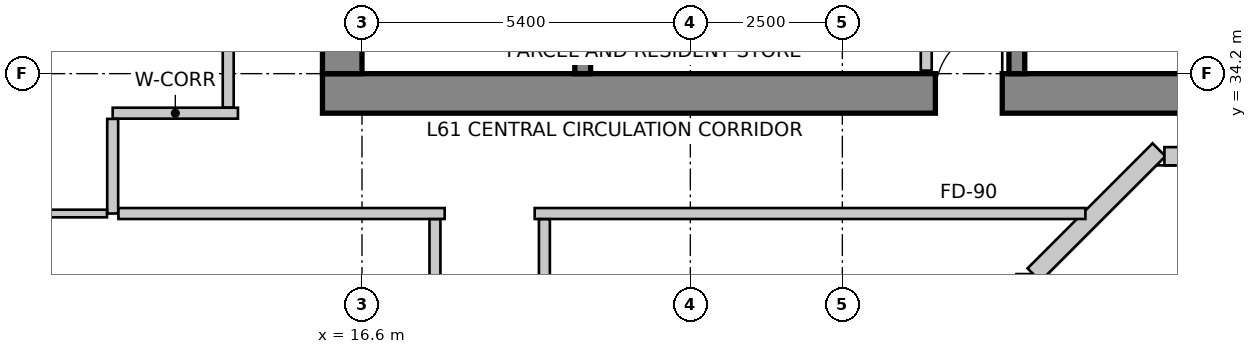
"""IFC4 building model, lengths in metres.
Left out: names, types, materials, properties, quantities, classifications, styles, units other than length and angle.
Written with IfcOpenShell. Run it as: python <this file> out.ifc"""

import sys

from ifc_helpers import new_model, si_unit, direction, frame, frame_2d, origin, place, context, subcontext, project, spatial, rectangle, extrude, source, transform, mapped, element, fill, save


model = new_model("IFC4")
c1 = context("Model", 3, precision=1e-05, world=origin(), true_north=direction((0.0, 1.0)))
c2 = subcontext(c1, "Body", "Model", "MODEL_VIEW")
j1 = project(units=[si_unit("LENGTHUNIT", "METRE"), si_unit("PLANEANGLEUNIT", "RADIAN")], contexts=[c1])
p1 = place(None, origin())
s1 = spatial("IfcSite", under=j1, at=p1, CompositionType="ELEMENT")
p2 = place(p1, origin())
s2 = spatial("IfcBuilding", under=s1, at=p2, CompositionType="ELEMENT")
p3 = place(p2, frame((0.0, 0.0, 239.4)))
s3 = spatial("IfcBuildingStorey", under=s2, at=p3, CompositionType="ELEMENT", Elevation=239.4)
p4 = place(p3, frame((15.95, 33.875, 0.0), z_axis=(0.0, 0.0, 1.0), x_axis=(1.0, 0.0, 0.0)))
e1 = element("IfcWall", 1, at=p4, inside=s3, PredefinedType="SHEAR", context=c2, shape_type="SweptSolid", body=[
    extrude(rectangle(XDim=15.7, YDim=0.65, at=frame_2d((7.85, 0.0))), origin(), (0.0, 0.0, 1.0), 3.5),
])
m1 = source(origin(), c2, "Body", "SweptSolid", [
    extrude(rectangle(XDim=1.1, YDim=2.15, at=frame_2d((0.55, 1.075))), frame((0.0, 0.335, 0.0), z_axis=(0.0, -1.0, 0.0), x_axis=(1.0, 0.0, 0.0)), (0.0, 0.0, 1.0), 0.67),
])
p5 = place(p4, frame((10.08, 0.0, 0.0)))
e2 = element("IfcOpeningElement", 2, at=p5, cuts=e1, PredefinedType="OPENING", context=c2, shape_type="MappedRepresentation", body=[
    mapped(m1, transform((0.0, 0.0, 0.0), scale=1.0)),
])
p6 = place(p3, frame((16.275, 34.2, 0.0), z_axis=(0.0, 0.0, 1.0), x_axis=(0.0, 1.0, 0.0)))
e3 = element("IfcWall", 3, at=p6, inside=s3, PredefinedType="SHEAR", context=c2, shape_type="SweptSolid", body=[
    extrude(rectangle(XDim=11.4, YDim=0.65, at=frame_2d((5.7, 0.0))), origin(), (0.0, 0.0, 1.0), 3.5),
])
p7 = place(p6, frame((7.15, 0.0, 0.0)))
e4 = element("IfcOpeningElement", 4, at=p7, cuts=e3, PredefinedType="OPENING", context=c2, shape_type="MappedRepresentation", body=[
    mapped(m1, transform((0.0, 0.0, 0.0), scale=1.0)),
])
p8 = place(p3, frame((20.23, 34.2, 0.0), z_axis=(0.0, 0.0, 1.0), x_axis=(0.0, 1.0, 0.0)))
e5 = element("IfcWall", 5, at=p8, inside=s3, PredefinedType="SHEAR", context=c2, shape_type="SweptSolid", body=[
    extrude(rectangle(XDim=9.06, YDim=0.26, at=frame_2d((4.53, 0.0))), origin(), (0.0, 0.0, 1.0), 3.5),
])
m2 = source(origin(), c2, "Body", "SweptSolid", [
    extrude(rectangle(XDim=1.1, YDim=2.15, at=frame_2d((0.55, 1.075))), frame((0.0, 0.14, 0.0), z_axis=(0.0, -1.0, 0.0), x_axis=(1.0, 0.0, 0.0)), (0.0, 0.0, 1.0), 0.28),
])
p9 = place(p8, frame((7.45, 0.0, 0.0)))
e6 = element("IfcOpeningElement", 6, at=p9, cuts=e5, PredefinedType="OPENING", context=c2, shape_type="MappedRepresentation", body=[
    mapped(m2, transform((0.0, 0.0, 0.0), scale=1.0)),
])
p10 = place(p3, frame((27.37, 34.2, 0.0), z_axis=(0.0, 0.0, 1.0), x_axis=(0.0, 1.0, 0.0)))
e7 = element("IfcWall", 7, at=p10, inside=s3, PredefinedType="SHEAR", context=c2, shape_type="SweptSolid", body=[
    extrude(rectangle(XDim=9.06, YDim=0.26, at=frame_2d((4.53, 0.0))), origin(), (0.0, 0.0, 1.0), 3.5),
])
p11 = place(p10, frame((7.45, 0.0, 0.0)))
e8 = element("IfcOpeningElement", 8, at=p11, cuts=e7, PredefinedType="OPENING", context=c2, shape_type="MappedRepresentation", body=[
    mapped(m2, transform((0.0, 0.0, 0.0), scale=1.0)),
])
p12 = place(p3, frame((27.514, 16.457, 0.0), z_axis=(0.0, 0.0, 1.0), x_axis=(0.0, 1.0, 0.0)))
e9 = element("IfcWall", 9, at=p12, inside=s3, PredefinedType="SOLIDWALL", context=c2, shape_type="SweptSolid", body=[
    extrude(rectangle(XDim=14.447, YDim=0.3, at=frame_2d((7.223, 0.0))), origin(), (0.0, 0.0, 1.0), 3.2),
])
m3 = source(origin(), c2, "Body", "SweptSolid", [
    extrude(rectangle(XDim=1.6, YDim=2.15, at=frame_2d((0.8, 1.075))), frame((0.0, 0.16, 0.0), z_axis=(0.0, -1.0, 0.0), x_axis=(1.0, 0.0, 0.0)), (0.0, 0.0, 1.0), 0.32),
])
p13 = place(p12, frame((8.993, 0.0, 0.0)))
e10 = element("IfcOpeningElement", 10, at=p13, cuts=e9, PredefinedType="OPENING", context=c2, shape_type="MappedRepresentation", body=[
    mapped(m3, transform((0.0, 0.0, 0.0), scale=1.0)),
])
m4 = source(origin(), c2, "Body", "SweptSolid", [
    extrude(rectangle(XDim=2.1, YDim=2.0, at=frame_2d((1.05, 1.0))), frame((0.0, 0.16, 0.0), z_axis=(0.0, -1.0, 0.0), x_axis=(1.0, 0.0, 0.0)), (0.0, 0.0, 1.0), 0.32),
])
p14 = place(p12, frame((0.521, 0.0, 0.85)))
e11 = element("IfcOpeningElement", 11, at=p14, cuts=e9, PredefinedType="OPENING", context=c2, shape_type="MappedRepresentation", body=[
    mapped(m4, transform((0.0, 0.0, 0.0), scale=1.0)),
])
p15 = place(p12, frame((4.243, 0.0, 0.85)))
e12 = element("IfcOpeningElement", 12, at=p15, cuts=e9, PredefinedType="OPENING", context=c2, shape_type="MappedRepresentation", body=[
    mapped(m4, transform((0.0, 0.0, 0.0), scale=1.0)),
])
p16 = place(p12, frame((11.45, 0.0, 0.85)))
e13 = element("IfcOpeningElement", 13, at=p16, cuts=e9, PredefinedType="OPENING", context=c2, shape_type="MappedRepresentation", body=[
    mapped(m4, transform((0.0, 0.0, 0.0), scale=1.0)),
])
p17 = place(p3, frame((27.652, 30.892, 0.0), z_axis=(0.0, 0.0, 1.0), x_axis=(0.707106781187, 0.707106781187, 0.0)))
e14 = element("IfcWall", 14, at=p17, inside=s3, PredefinedType="SOLIDWALL", context=c2, shape_type="SweptSolid", body=[
    extrude(rectangle(XDim=2.907, YDim=0.3, at=frame_2d((1.454, 0.0))), origin(), (0.0, 0.0, 1.0), 3.2),
])
p18 = place(p3, frame((29.797, 32.842, 0.0), z_axis=(0.0, 0.0, 1.0), x_axis=(1.0, 0.0, 0.0)))
e15 = element("IfcWall", 15, at=p18, inside=s3, PredefinedType="SOLIDWALL", context=c2, shape_type="SweptSolid", body=[
    extrude(rectangle(XDim=0.882, YDim=0.3, at=frame_2d((0.441, 0.0))), origin(), (0.0, 0.0, 1.0), 3.2),
])
p19 = place(p3, frame((13.269, 47.134, 0.0), z_axis=(0.0, 0.0, 1.0), x_axis=(-0.319920776449, -0.947444297464, 0.0)))
e16 = element("IfcWall", 16, at=p19, inside=s3, PredefinedType="SOLIDWALL", context=c2, shape_type="SweptSolid", body=[
    extrude(rectangle(XDim=16.133, YDim=0.3, at=frame_2d((8.067, 0.0))), origin(), (0.0, 0.0, 1.0), 3.2),
])
p20 = place(p19, frame((2.513, 0.0, 0.85)))
e17 = element("IfcOpeningElement", 17, at=p20, cuts=e16, PredefinedType="OPENING", context=c2, shape_type="MappedRepresentation", body=[
    mapped(m4, transform((0.0, 0.0, 0.0), scale=1.0)),
])
m5 = source(origin(), c2, "Body", "SweptSolid", [
    extrude(rectangle(XDim=2.4, YDim=2.2, at=frame_2d((1.2, 1.1))), frame((0.0, 0.16, 0.0), z_axis=(0.0, -1.0, 0.0), x_axis=(1.0, 0.0, 0.0)), (0.0, 0.0, 1.0), 0.32),
])
p21 = place(p19, frame((7.26, 0.0, 0.85)))
e18 = element("IfcOpeningElement", 18, at=p21, cuts=e16, PredefinedType="OPENING", context=c2, shape_type="MappedRepresentation", body=[
    mapped(m5, transform((0.0, 0.0, 0.0), scale=1.0)),
])
p22 = place(p19, frame((12.307, 0.0, 0.85)))
e19 = element("IfcOpeningElement", 19, at=p22, cuts=e16, PredefinedType="OPENING", context=c2, shape_type="MappedRepresentation", body=[
    mapped(m4, transform((0.0, 0.0, 0.0), scale=1.0)),
])
p23 = place(p3, frame((8.188, 31.834, 0.0), z_axis=(0.0, 0.0, 1.0), x_axis=(0.202303475707, -0.979322880217, 0.0)))
e20 = element("IfcWall", 20, at=p23, inside=s3, PredefinedType="SOLIDWALL", context=c2, shape_type="SweptSolid", body=[
    extrude(rectangle(XDim=15.766, YDim=0.3, at=frame_2d((7.883, 0.0))), origin(), (0.0, 0.0, 1.0), 3.2),
])
p24 = place(p23, frame((2.14, 0.0, 0.85)))
e21 = element("IfcOpeningElement", 21, at=p24, cuts=e20, PredefinedType="OPENING", context=c2, shape_type="MappedRepresentation", body=[
    mapped(m5, transform((0.0, 0.0, 0.0), scale=1.0)),
])
p25 = place(p23, frame((8.329, 0.0, 0.85)))
e22 = element("IfcOpeningElement", 22, at=p25, cuts=e20, PredefinedType="OPENING", context=c2, shape_type="MappedRepresentation", body=[
    mapped(m4, transform((0.0, 0.0, 0.0), scale=1.0)),
])
p26 = place(p23, frame((12.942, 0.0, 0.85)))
e23 = element("IfcOpeningElement", 23, at=p26, cuts=e20, PredefinedType="OPENING", context=c2, shape_type="MappedRepresentation", body=[
    mapped(m5, transform((0.0, 0.0, 0.0), scale=1.0)),
])
p27 = place(p3, frame((25.88, 35.956, 0.0), z_axis=(0.0, 0.0, 1.0), x_axis=(0.0, -1.0, 0.0)))
e24 = element("IfcWall", 24, at=p27, inside=s3, PredefinedType="PARTITIONING", context=c2, shape_type="SweptSolid", body=[
    extrude(rectangle(XDim=1.706, YDim=0.18, at=frame_2d((0.853, 0.0))), origin(), (0.0, 0.0, 1.0), 2.492),
])
p28 = place(p3, frame((12.5, 33.55, 0.0), z_axis=(0.0, 0.0, 1.0), x_axis=(1.0, 0.0, 0.0)))
e25 = element("IfcWall", 25, at=p28, inside=s3, PredefinedType="PARTITIONING", context=c2, shape_type="SweptSolid", body=[
    extrude(rectangle(XDim=2.06, YDim=0.18, at=frame_2d((1.03, 0.0))), origin(), (0.0, 0.0, 1.0), 3.2),
])
p29 = place(p3, frame((12.5, 31.9, 0.0), z_axis=(0.0, 0.0, 1.0), x_axis=(0.0, 1.0, 0.0)))
e26 = element("IfcWall", 26, at=p29, inside=s3, PredefinedType="PARTITIONING", context=c2, shape_type="SweptSolid", body=[
    extrude(rectangle(XDim=1.556, YDim=0.18, at=frame_2d((0.778, 0.0))), origin(), (0.0, 0.0, 1.0), 2.869),
])
p30 = place(p3, frame((17.96, 31.9, 0.0), z_axis=(0.0, 0.0, 1.0), x_axis=(-1.0, 0.0, 0.0)))
e27 = element("IfcWall", 27, at=p30, inside=s3, PredefinedType="PARTITIONING", context=c2, shape_type="SweptSolid", body=[
    extrude(rectangle(XDim=5.366, YDim=0.18, at=frame_2d((2.683, 0.0))), origin(), (0.0, 0.0, 1.0), 2.869),
])
p31 = place(p3, frame((28.497, 31.9, 0.0), z_axis=(0.0, 0.0, 1.0), x_axis=(-1.0, 0.0, 0.0)))
e28 = element("IfcWall", 28, at=p31, inside=s3, PredefinedType="PARTITIONING", context=c2, shape_type="SweptSolid", body=[
    extrude(rectangle(XDim=9.057, YDim=0.18, at=frame_2d((4.529, 0.0))), origin(), (0.0, 0.0, 1.0), 2.869),
])
p32 = place(p3, frame((14.4, 33.644, 0.0), z_axis=(0.0, 0.0, 1.0), x_axis=(0.0, 1.0, 0.0)))
e29 = element("IfcWall", 29, at=p32, inside=s3, PredefinedType="PARTITIONING", context=c2, shape_type="SweptSolid", body=[
    extrude(rectangle(XDim=12.606, YDim=0.18, at=frame_2d((6.303, 0.0))), origin(), (0.0, 0.0, 1.0), 3.2),
])
m6 = source(origin(), c2, "Body", "SweptSolid", [
    extrude(rectangle(XDim=0.9, YDim=2.15, at=frame_2d((0.45, 1.075))), frame((0.0, 0.1, 0.0), z_axis=(0.0, -1.0, 0.0), x_axis=(1.0, 0.0, 0.0)), (0.0, 0.0, 1.0), 0.2),
])
p33 = place(p32, frame((4.399, 0.0, 0.0)))
e30 = element("IfcOpeningElement", 30, at=p33, cuts=e29, PredefinedType="OPENING", context=c2, shape_type="MappedRepresentation", body=[
    mapped(m6, transform((0.0, 0.0, 0.0), scale=1.0)),
])
p34 = place(p3, frame((12.406, 31.9, 0.0), z_axis=(0.0, 0.0, 1.0), x_axis=(-1.0, 0.0, 0.0)))
e31 = element("IfcWall", 31, at=p34, inside=s3, PredefinedType="PARTITIONING", context=c2, shape_type="SweptSolid", body=[
    extrude(rectangle(XDim=4.115, YDim=0.125, at=frame_2d((2.057, 0.0))), origin(), (0.0, 0.0, 1.0), 2.492),
])
p35 = place(p3, frame((17.8, 19.5, 0.0), z_axis=(0.0, 0.0, 1.0), x_axis=(0.0, 1.0, 0.0)))
e32 = element("IfcWall", 32, at=p35, inside=s3, PredefinedType="PARTITIONING", context=c2, shape_type="SweptSolid", body=[
    extrude(rectangle(XDim=12.306, YDim=0.18, at=frame_2d((6.153, 0.0))), origin(), (0.0, 0.0, 1.0), 2.716),
])
p36 = place(p35, frame((5.703, 0.0, 0.0)))
e33 = element("IfcOpeningElement", 33, at=p36, cuts=e32, PredefinedType="OPENING", context=c2, shape_type="MappedRepresentation", body=[
    mapped(m6, transform((0.0, 0.0, 0.0), scale=1.0)),
])
p37 = place(p3, frame((19.6, 31.806, 0.0), z_axis=(0.0, 0.0, 1.0), x_axis=(0.0, -1.0, 0.0)))
e34 = element("IfcWall", 34, at=p37, inside=s3, PredefinedType="PARTITIONING", context=c2, shape_type="SweptSolid", body=[
    extrude(rectangle(XDim=7.966, YDim=0.18, at=frame_2d((3.983, 0.0))), origin(), (0.0, 0.0, 1.0), 2.716),
])
p38 = place(p37, frame((3.533, 0.0, 0.0)))
e35 = element("IfcOpeningElement", 35, at=p38, cuts=e34, PredefinedType="OPENING", context=c2, shape_type="MappedRepresentation", body=[
    mapped(m6, transform((0.0, 0.0, 0.0), scale=1.0)),
])
m7 = source(origin(), c2, "Body", "SweptSolid", [
    extrude(rectangle(XDim=1.1, YDim=2.15, at=frame_2d((0.55, 1.075))), frame((0.0, 0.025, 0.0), z_axis=(0.0, -1.0, 0.0), x_axis=(1.0, 0.0, 0.0)), (0.0, 0.0, 1.0), 0.05),
])
p39 = place(p5, origin())
e36 = element("IfcDoor", 36, at=p39, inside=s3, OperationType="SINGLE_SWING_RIGHT", PredefinedType="DOOR", context=c2, shape_type="MappedRepresentation", body=[
    mapped(m7, transform((0.0, 0.0, 0.0), scale=1.0)),
])
fill(e2, e36)
save(model, sys.argv[1])
